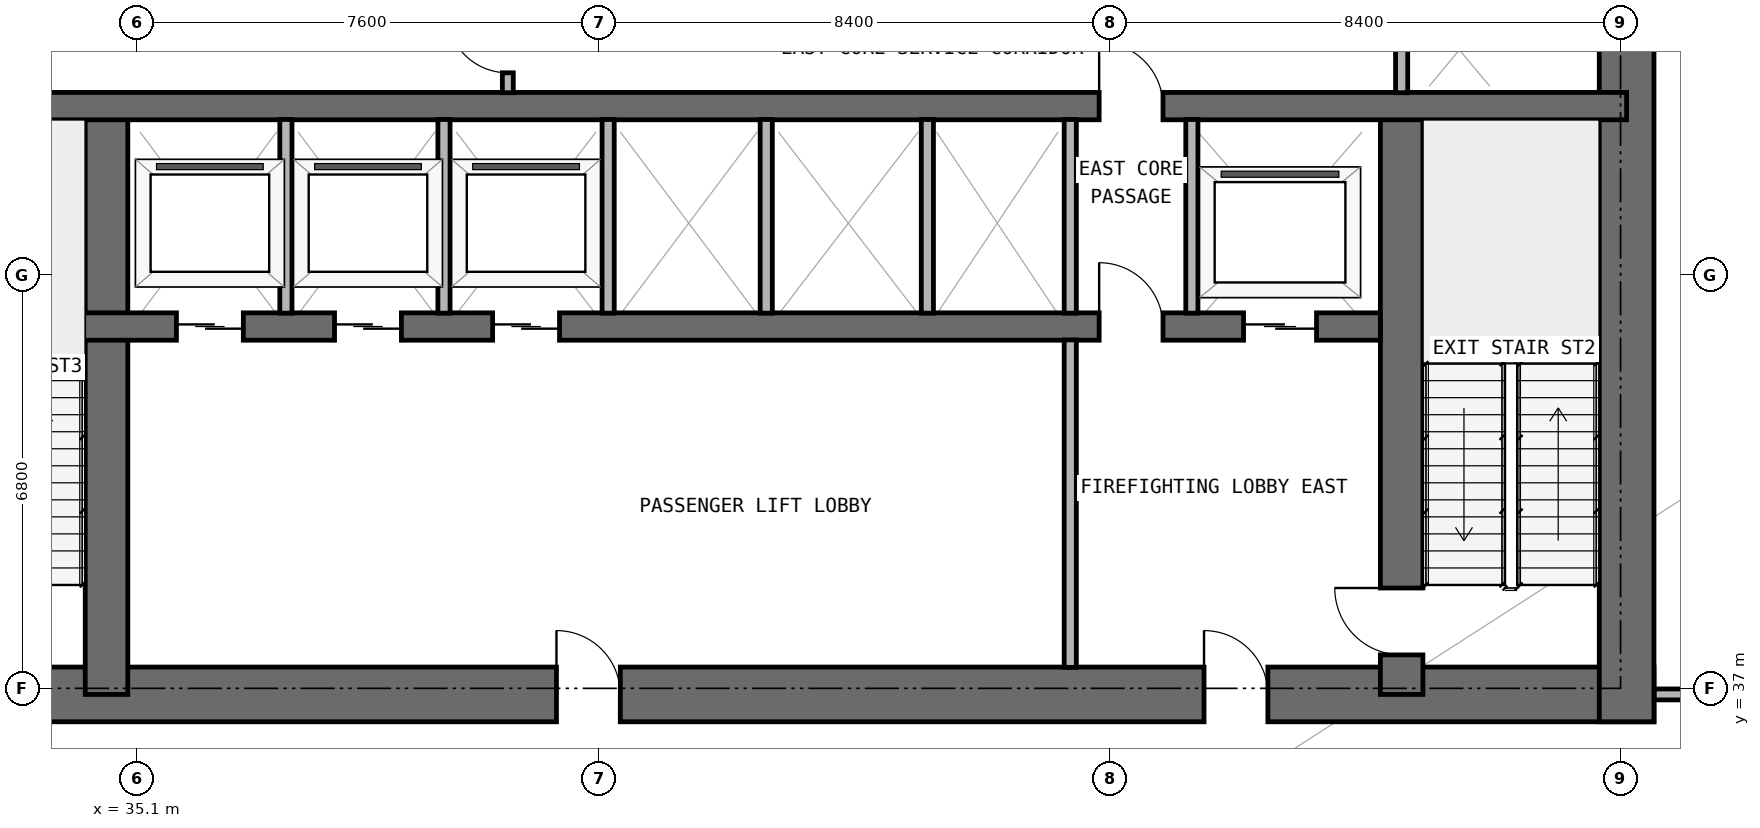
"""IFC4 building model, lengths in metres.
Left out: names, types, materials, properties, quantities, classifications, styles, units other than length and angle.
Written with IfcOpenShell. Run it as: python <this file> out.ifc"""

import sys

from ifc_helpers import new_model, si_unit, direction, frame, frame_2d, origin, place, context, subcontext, project, spatial, rectangle, extrude, element, fill, save


model = new_model("IFC4")
c1 = context("Model", 3, precision=1e-05, world=origin(), true_north=direction((0.0, 1.0)))
c2 = subcontext(c1, "Body", "Model", "MODEL_VIEW")
j1 = project(units=[si_unit("LENGTHUNIT", "METRE"), si_unit("PLANEANGLEUNIT", "RADIAN")], contexts=[c1])
p1 = place(None, origin())
s1 = spatial("IfcSite", under=j1, at=p1, CompositionType="ELEMENT")
p2 = place(p1, origin())
s2 = spatial("IfcBuilding", under=s1, at=p2, CompositionType="ELEMENT")
p3 = place(p2, frame((0.0, 0.0, 15.0)))
s3 = spatial("IfcBuildingStorey", under=s2, at=p3, CompositionType="ELEMENT", Elevation=15.0)
p4 = place(p3, frame((17.75, 36.9, 0.0), z_axis=(0.0, 0.0, 1.0), x_axis=(1.0, 0.0, 0.0)))
e1 = element("IfcWall", 1, at=p4, inside=s3, PredefinedType="SHEAR", context=c2, shape_type="SweptSolid", body=[
    extrude(rectangle(XDim=42.3, YDim=0.9, at=frame_2d((21.15, 0.0))), origin(), (0.0, 0.0, 1.0), 4.5),
])
p5 = place(p4, frame((14.55, 0.0, 0.0)))
e2 = element("IfcOpeningElement", 2, at=p5, cuts=e1, PredefinedType="OPENING", context=c2, shape_type="SweptSolid", body=[
    extrude(rectangle(XDim=1.1, YDim=2.15, at=frame_2d((0.55, 1.075))), frame((0.0, 0.46, 0.0), z_axis=(0.0, -1.0, 0.0), x_axis=(1.0, 0.0, 0.0)), (0.0, 0.0, 1.0), 0.92),
])
p6 = place(p4, frame((6.4, 0.0, 0.0)))
e3 = element("IfcOpeningElement", 3, at=p6, cuts=e1, PredefinedType="OPENING", context=c2, shape_type="SweptSolid", body=[
    extrude(rectangle(XDim=1.05, YDim=2.15, at=frame_2d((0.525, 1.075))), frame((0.0, 0.46, 0.0), z_axis=(0.0, -1.0, 0.0), x_axis=(1.0, 0.0, 0.0)), (0.0, 0.0, 1.0), 0.92),
])
p7 = place(p4, frame((34.9, 0.0, 0.0)))
e4 = element("IfcOpeningElement", 4, at=p7, cuts=e1, PredefinedType="OPENING", context=c2, shape_type="SweptSolid", body=[
    extrude(rectangle(XDim=1.05, YDim=2.15, at=frame_2d((0.525, 1.075))), frame((0.0, 0.46, 0.0), z_axis=(0.0, -1.0, 0.0), x_axis=(1.0, 0.0, 0.0)), (0.0, 0.0, 1.0), 0.92),
])
p8 = place(p4, frame((11.012, 0.0, 0.0)))
e5 = element("IfcOpeningElement", 5, at=p8, cuts=e1, PredefinedType="OPENING", context=c2, shape_type="SweptSolid", body=[
    extrude(rectangle(XDim=1.05, YDim=2.15, at=frame_2d((0.525, 1.075))), frame((0.0, 0.46, 0.0), z_axis=(0.0, -1.0, 0.0), x_axis=(1.0, 0.0, 0.0)), (0.0, 0.0, 1.0), 0.92),
])
p9 = place(p4, frame((24.25, 0.0, 0.0)))
e6 = element("IfcOpeningElement", 6, at=p9, cuts=e1, PredefinedType="OPENING", context=c2, shape_type="SweptSolid", body=[
    extrude(rectangle(XDim=1.05, YDim=2.15, at=frame_2d((0.525, 1.075))), frame((0.0, 0.46, 0.0), z_axis=(0.0, -1.0, 0.0), x_axis=(1.0, 0.0, 0.0)), (0.0, 0.0, 1.0), 0.92),
])
p10 = place(p3, frame((59.6, 36.45, 0.0), z_axis=(0.0, 0.0, 1.0), x_axis=(0.0, 1.0, 0.0)))
e7 = element("IfcWall", 7, at=p10, inside=s3, PredefinedType="SHEAR", context=c2, shape_type="SweptSolid", body=[
    extrude(rectangle(XDim=14.15, YDim=0.9, at=frame_2d((7.075, 0.0))), origin(), (0.0, 0.0, 1.0), 4.5),
])
p11 = place(p3, frame((55.9, 36.9, 0.0), z_axis=(0.0, 0.0, 1.0), x_axis=(0.0, 1.0, 0.0)))
e8 = element("IfcWall", 8, at=p11, inside=s3, PredefinedType="SHEAR", context=c2, shape_type="SweptSolid", body=[
    extrude(rectangle(XDim=9.675, YDim=0.7, at=frame_2d((4.837, 0.0))), origin(), (0.0, 0.0, 1.0), 4.5),
])
p12 = place(p11, frame((0.65, 0.0, 0.0)))
e9 = element("IfcOpeningElement", 9, at=p12, cuts=e8, PredefinedType="OPENING", context=c2, shape_type="SweptSolid", body=[
    extrude(rectangle(XDim=1.1, YDim=2.15, at=frame_2d((0.55, 1.075))), frame((0.0, 0.36, 0.0), z_axis=(0.0, -1.0, 0.0), x_axis=(1.0, 0.0, 0.0)), (0.0, 0.0, 1.0), 0.72),
])
p13 = place(p3, frame((34.6, 36.9, 0.0), z_axis=(0.0, 0.0, 1.0), x_axis=(0.0, 1.0, 0.0)))
e10 = element("IfcWall", 10, at=p13, inside=s3, PredefinedType="SHEAR", context=c2, shape_type="SweptSolid", body=[
    extrude(rectangle(XDim=9.675, YDim=0.7, at=frame_2d((4.837, 0.0))), origin(), (0.0, 0.0, 1.0), 4.5),
])
p14 = place(p3, frame((22.25, 42.95, 0.0), z_axis=(0.0, 0.0, 1.0), x_axis=(1.0, 0.0, 0.0)))
e11 = element("IfcWall", 11, at=p14, inside=s3, PredefinedType="SHEAR", context=c2, shape_type="SweptSolid", body=[
    extrude(rectangle(XDim=33.3, YDim=0.45, at=frame_2d((16.65, 0.0))), origin(), (0.0, 0.0, 1.0), 4.5),
])
p15 = place(p14, frame((1.05, 0.0, 0.0)))
e12 = element("IfcOpeningElement", 12, at=p15, cuts=e11, PredefinedType="OPENING", context=c2, shape_type="SweptSolid", body=[
    extrude(rectangle(XDim=1.2, YDim=2.2, at=frame_2d((0.6, 1.1))), frame((0.0, 0.235, 0.0), z_axis=(0.0, -1.0, 0.0), x_axis=(1.0, 0.0, 0.0)), (0.0, 0.0, 1.0), 0.47),
])
p16 = place(p14, frame((31.05, 0.0, 0.0)))
e13 = element("IfcOpeningElement", 13, at=p16, cuts=e11, PredefinedType="OPENING", context=c2, shape_type="SweptSolid", body=[
    extrude(rectangle(XDim=1.2, YDim=2.2, at=frame_2d((0.6, 1.1))), frame((0.0, 0.235, 0.0), z_axis=(0.0, -1.0, 0.0), x_axis=(1.0, 0.0, 0.0)), (0.0, 0.0, 1.0), 0.47),
])
p17 = place(p14, frame((13.5, 0.0, 0.0)))
e14 = element("IfcOpeningElement", 14, at=p17, cuts=e11, PredefinedType="OPENING", context=c2, shape_type="SweptSolid", body=[
    extrude(rectangle(XDim=1.1, YDim=2.2, at=frame_2d((0.55, 1.1))), frame((0.0, 0.235, 0.0), z_axis=(0.0, -1.0, 0.0), x_axis=(1.0, 0.0, 0.0)), (0.0, 0.0, 1.0), 0.47),
])
p18 = place(p14, frame((16.1, 0.0, 0.0)))
e15 = element("IfcOpeningElement", 15, at=p18, cuts=e11, PredefinedType="OPENING", context=c2, shape_type="SweptSolid", body=[
    extrude(rectangle(XDim=1.1, YDim=2.2, at=frame_2d((0.55, 1.1))), frame((0.0, 0.235, 0.0), z_axis=(0.0, -1.0, 0.0), x_axis=(1.0, 0.0, 0.0)), (0.0, 0.0, 1.0), 0.47),
])
p19 = place(p14, frame((18.7, 0.0, 0.0)))
e16 = element("IfcOpeningElement", 16, at=p19, cuts=e11, PredefinedType="OPENING", context=c2, shape_type="SweptSolid", body=[
    extrude(rectangle(XDim=1.1, YDim=2.2, at=frame_2d((0.55, 1.1))), frame((0.0, 0.235, 0.0), z_axis=(0.0, -1.0, 0.0), x_axis=(1.0, 0.0, 0.0)), (0.0, 0.0, 1.0), 0.47),
])
p20 = place(p14, frame((3.625, 0.0, 0.0)))
e17 = element("IfcOpeningElement", 17, at=p20, cuts=e11, PredefinedType="OPENING", context=c2, shape_type="SweptSolid", body=[
    extrude(rectangle(XDim=1.05, YDim=2.15, at=frame_2d((0.525, 1.075))), frame((0.0, 0.235, 0.0), z_axis=(0.0, -1.0, 0.0), x_axis=(1.0, 0.0, 0.0)), (0.0, 0.0, 1.0), 0.47),
])
p21 = place(p14, frame((28.675, 0.0, 0.0)))
e18 = element("IfcOpeningElement", 18, at=p21, cuts=e11, PredefinedType="OPENING", context=c2, shape_type="SweptSolid", body=[
    extrude(rectangle(XDim=1.05, YDim=2.15, at=frame_2d((0.525, 1.075))), frame((0.0, 0.235, 0.0), z_axis=(0.0, -1.0, 0.0), x_axis=(1.0, 0.0, 0.0)), (0.0, 0.0, 1.0), 0.47),
])
p22 = place(p3, frame((18.2, 46.575, 0.0), z_axis=(0.0, 0.0, 1.0), x_axis=(1.0, 0.0, 0.0)))
e19 = element("IfcWall", 19, at=p22, inside=s3, PredefinedType="SHEAR", context=c2, shape_type="SweptSolid", body=[
    extrude(rectangle(XDim=41.4, YDim=0.45, at=frame_2d((20.7, 0.0))), origin(), (0.0, 0.0, 1.0), 4.5),
])
p23 = place(p22, frame((7.7, 0.0, 0.0)))
e20 = element("IfcOpeningElement", 20, at=p23, cuts=e19, PredefinedType="OPENING", context=c2, shape_type="SweptSolid", body=[
    extrude(rectangle(XDim=1.0, YDim=2.2, at=frame_2d((0.5, 1.1))), frame((0.0, 0.235, 0.0), z_axis=(0.0, -1.0, 0.0), x_axis=(1.0, 0.0, 0.0)), (0.0, 0.0, 1.0), 0.47),
])
p24 = place(p22, frame((32.725, 0.0, 0.0)))
e21 = element("IfcOpeningElement", 21, at=p24, cuts=e19, PredefinedType="OPENING", context=c2, shape_type="SweptSolid", body=[
    extrude(rectangle(XDim=1.05, YDim=2.15, at=frame_2d((0.525, 1.075))), frame((0.0, 0.235, 0.0), z_axis=(0.0, -1.0, 0.0), x_axis=(1.0, 0.0, 0.0)), (0.0, 0.0, 1.0), 0.47),
])
for number, where, z_axis, x_axis in (
    (22, (37.55, 43.17, 0.0), (0.0, 0.0, 1.0), (0.0, 1.0, 0.0)),
    (23, (40.15, 43.17, 0.0), (0.0, 0.0, 1.0), (0.0, 1.0, 0.0)),
):
    element("IfcWall", number, at=place(p3, frame(where, z_axis=z_axis, x_axis=x_axis)), inside=s3, PredefinedType="PARTITIONING", context=c2, shape_type="SweptSolid", body=[
        extrude(rectangle(XDim=3.185, YDim=0.2, at=frame_2d((1.593, 0.0))), origin(), (0.0, 0.0, 1.0), 4.5),
    ])
p25 = place(p3, frame((41.2, 46.795, 0.0), z_axis=(0.0, 0.0, 1.0), x_axis=(0.0, 1.0, 0.0)))
e24 = element("IfcWall", 24, at=p25, inside=s3, PredefinedType="PARTITIONING", context=c2, shape_type="SweptSolid", body=[
    extrude(rectangle(XDim=3.06, YDim=0.18, at=frame_2d((1.53, 0.0))), origin(), (0.0, 0.0, 1.0), 4.5),
])
p26 = place(p25, frame((0.327, 0.0, 0.0)))
e25 = element("IfcOpeningElement", 25, at=p26, cuts=e24, PredefinedType="OPENING", context=c2, shape_type="SweptSolid", body=[
    extrude(rectangle(XDim=1.0, YDim=2.2, at=frame_2d((0.5, 1.1))), frame((0.0, 0.1, 0.0), z_axis=(0.0, -1.0, 0.0), x_axis=(1.0, 0.0, 0.0)), (0.0, 0.0, 1.0), 0.2),
])
for number, where, z_axis, x_axis in (
    (26, (42.85, 43.17, 0.0), (0.0, 0.0, 1.0), (0.0, 1.0, 0.0)),
    (27, (45.45, 43.17, 0.0), (0.0, 0.0, 1.0), (0.0, 1.0, 0.0)),
    (28, (48.1, 43.17, 0.0), (0.0, 0.0, 1.0), (0.0, 1.0, 0.0)),
):
    element("IfcWall", number, at=place(p3, frame(where, z_axis=z_axis, x_axis=x_axis)), inside=s3, PredefinedType="PARTITIONING", context=c2, shape_type="SweptSolid", body=[
        extrude(rectangle(XDim=3.185, YDim=0.2, at=frame_2d((1.593, 0.0))), origin(), (0.0, 0.0, 1.0), 4.5),
    ])
p27 = place(p3, frame((50.45, 37.345, 0.0), z_axis=(0.0, 0.0, 1.0), x_axis=(0.0, 1.0, 0.0)))
e29 = element("IfcWall", 29, at=p27, inside=s3, PredefinedType="PARTITIONING", context=c2, shape_type="SweptSolid", body=[
    extrude(rectangle(XDim=5.385, YDim=0.2, at=frame_2d((2.692, 0.0))), origin(), (0.0, 0.0, 1.0), 4.5),
])
for number, where, z_axis, x_axis in (
    (30, (50.45, 43.17, 0.0), (0.0, 0.0, 1.0), (0.0, 1.0, 0.0)),
    (31, (52.45, 43.17, 0.0), (0.0, 0.0, 1.0), (0.0, 1.0, 0.0)),
):
    element("IfcWall", number, at=place(p3, frame(where, z_axis=z_axis, x_axis=x_axis)), inside=s3, PredefinedType="PARTITIONING", context=c2, shape_type="SweptSolid", body=[
        extrude(rectangle(XDim=3.185, YDim=0.2, at=frame_2d((1.593, 0.0))), origin(), (0.0, 0.0, 1.0), 4.5),
    ])
p28 = place(p3, frame((55.9, 46.795, 0.0), z_axis=(0.0, 0.0, 1.0), x_axis=(0.0, 1.0, 0.0)))
e32 = element("IfcWall", 32, at=p28, inside=s3, PredefinedType="PARTITIONING", context=c2, shape_type="SweptSolid", body=[
    extrude(rectangle(XDim=3.06, YDim=0.2, at=frame_2d((1.53, 0.0))), origin(), (0.0, 0.0, 1.0), 4.5),
])
p29 = place(p3, frame((60.055, 36.9, 0.0), z_axis=(0.0, 0.0, 1.0), x_axis=(1.0, 0.0, 0.0)))
e33 = element("IfcWall", 33, at=p29, inside=s3, PredefinedType="PARTITIONING", context=c2, shape_type="SweptSolid", body=[
    extrude(rectangle(XDim=16.45, YDim=0.18, at=frame_2d((8.225, 0.0))), origin(), (0.0, 0.0, 1.0), 4.5),
])
p30 = place(p29, frame((7.625, 0.0, 0.0)))
e34 = element("IfcOpeningElement", 34, at=p30, cuts=e33, PredefinedType="OPENING", context=c2, shape_type="SweptSolid", body=[
    extrude(rectangle(XDim=1.2, YDim=2.2, at=frame_2d((0.6, 1.1))), frame((0.0, 0.1, 0.0), z_axis=(0.0, -1.0, 0.0), x_axis=(1.0, 0.0, 0.0)), (0.0, 0.0, 1.0), 0.2),
])
p31 = place(p16, origin())
e35 = element("IfcDoor", 35, at=p31, inside=s3, OperationType="DOUBLE_DOOR_SLIDING", PredefinedType="DOOR", context=c2, shape_type="SweptSolid", body=[
    extrude(rectangle(XDim=1.2, YDim=2.2, at=frame_2d((0.6, 1.1))), frame((0.0, 0.025, 0.0), z_axis=(0.0, -1.0, 0.0), x_axis=(1.0, 0.0, 0.0)), (0.0, 0.0, 1.0), 0.05),
])
fill(e13, e35)
p32 = place(p17, origin())
e36 = element("IfcDoor", 36, at=p32, inside=s3, OperationType="DOUBLE_DOOR_SLIDING", PredefinedType="DOOR", context=c2, shape_type="SweptSolid", body=[
    extrude(rectangle(XDim=1.1, YDim=2.2, at=frame_2d((0.55, 1.1))), frame((0.0, 0.025, 0.0), z_axis=(0.0, -1.0, 0.0), x_axis=(1.0, 0.0, 0.0)), (0.0, 0.0, 1.0), 0.05),
])
fill(e14, e36)
p33 = place(p18, origin())
e37 = element("IfcDoor", 37, at=p33, inside=s3, OperationType="DOUBLE_DOOR_SLIDING", PredefinedType="DOOR", context=c2, shape_type="SweptSolid", body=[
    extrude(rectangle(XDim=1.1, YDim=2.2, at=frame_2d((0.55, 1.1))), frame((0.0, 0.025, 0.0), z_axis=(0.0, -1.0, 0.0), x_axis=(1.0, 0.0, 0.0)), (0.0, 0.0, 1.0), 0.05),
])
fill(e15, e37)
p34 = place(p19, origin())
e38 = element("IfcDoor", 38, at=p34, inside=s3, OperationType="DOUBLE_DOOR_SLIDING", PredefinedType="DOOR", context=c2, shape_type="SweptSolid", body=[
    extrude(rectangle(XDim=1.1, YDim=2.2, at=frame_2d((0.55, 1.1))), frame((0.0, 0.025, 0.0), z_axis=(0.0, -1.0, 0.0), x_axis=(1.0, 0.0, 0.0)), (0.0, 0.0, 1.0), 0.05),
])
fill(e16, e38)
p35 = place(p7, origin())
e39 = element("IfcDoor", 39, at=p35, inside=s3, OperationType="SINGLE_SWING_LEFT", PredefinedType="DOOR", context=c2, shape_type="SweptSolid", body=[
    extrude(rectangle(XDim=1.05, YDim=2.15, at=frame_2d((0.525, 1.075))), frame((0.0, 0.025, 0.0), z_axis=(0.0, -1.0, 0.0), x_axis=(1.0, 0.0, 0.0)), (0.0, 0.0, 1.0), 0.05),
])
fill(e4, e39)
p36 = place(p12, origin())
e40 = element("IfcDoor", 40, at=p36, inside=s3, OperationType="SINGLE_SWING_RIGHT", PredefinedType="DOOR", context=c2, shape_type="SweptSolid", body=[
    extrude(rectangle(XDim=1.1, YDim=2.15, at=frame_2d((0.55, 1.075))), frame((0.0, 0.025, 0.0), z_axis=(0.0, -1.0, 0.0), x_axis=(1.0, 0.0, 0.0)), (0.0, 0.0, 1.0), 0.05),
])
fill(e9, e40)
p37 = place(p21, origin())
e41 = element("IfcDoor", 41, at=p37, inside=s3, OperationType="SINGLE_SWING_LEFT", PredefinedType="DOOR", context=c2, shape_type="SweptSolid", body=[
    extrude(rectangle(XDim=1.05, YDim=2.15, at=frame_2d((0.525, 1.075))), frame((0.0, 0.025, 0.0), z_axis=(0.0, -1.0, 0.0), x_axis=(1.0, 0.0, 0.0)), (0.0, 0.0, 1.0), 0.05),
])
fill(e18, e41)
p38 = place(p9, origin())
e42 = element("IfcDoor", 42, at=p38, inside=s3, OperationType="SINGLE_SWING_LEFT", PredefinedType="DOOR", context=c2, shape_type="SweptSolid", body=[
    extrude(rectangle(XDim=1.05, YDim=2.15, at=frame_2d((0.525, 1.075))), frame((0.0, 0.025, 0.0), z_axis=(0.0, -1.0, 0.0), x_axis=(1.0, 0.0, 0.0)), (0.0, 0.0, 1.0), 0.05),
])
fill(e6, e42)
p39 = place(p24, origin())
e43 = element("IfcDoor", 43, at=p39, inside=s3, OperationType="SINGLE_SWING_LEFT", PredefinedType="DOOR", context=c2, shape_type="SweptSolid", body=[
    extrude(rectangle(XDim=1.05, YDim=2.15, at=frame_2d((0.525, 1.075))), frame((0.0, 0.025, 0.0), z_axis=(0.0, -1.0, 0.0), x_axis=(1.0, 0.0, 0.0)), (0.0, 0.0, 1.0), 0.05),
])
fill(e21, e43)
p40 = place(p26, origin())
e44 = element("IfcDoor", 44, at=p40, inside=s3, OperationType="SINGLE_SWING_RIGHT", PredefinedType="DOOR", context=c2, shape_type="SweptSolid", body=[
    extrude(rectangle(XDim=1.0, YDim=2.2, at=frame_2d((0.5, 1.1))), frame((0.0, 0.025, 0.0), z_axis=(0.0, -1.0, 0.0), x_axis=(1.0, 0.0, 0.0)), (0.0, 0.0, 1.0), 0.05),
])
fill(e25, e44)
save(model, sys.argv[1])
